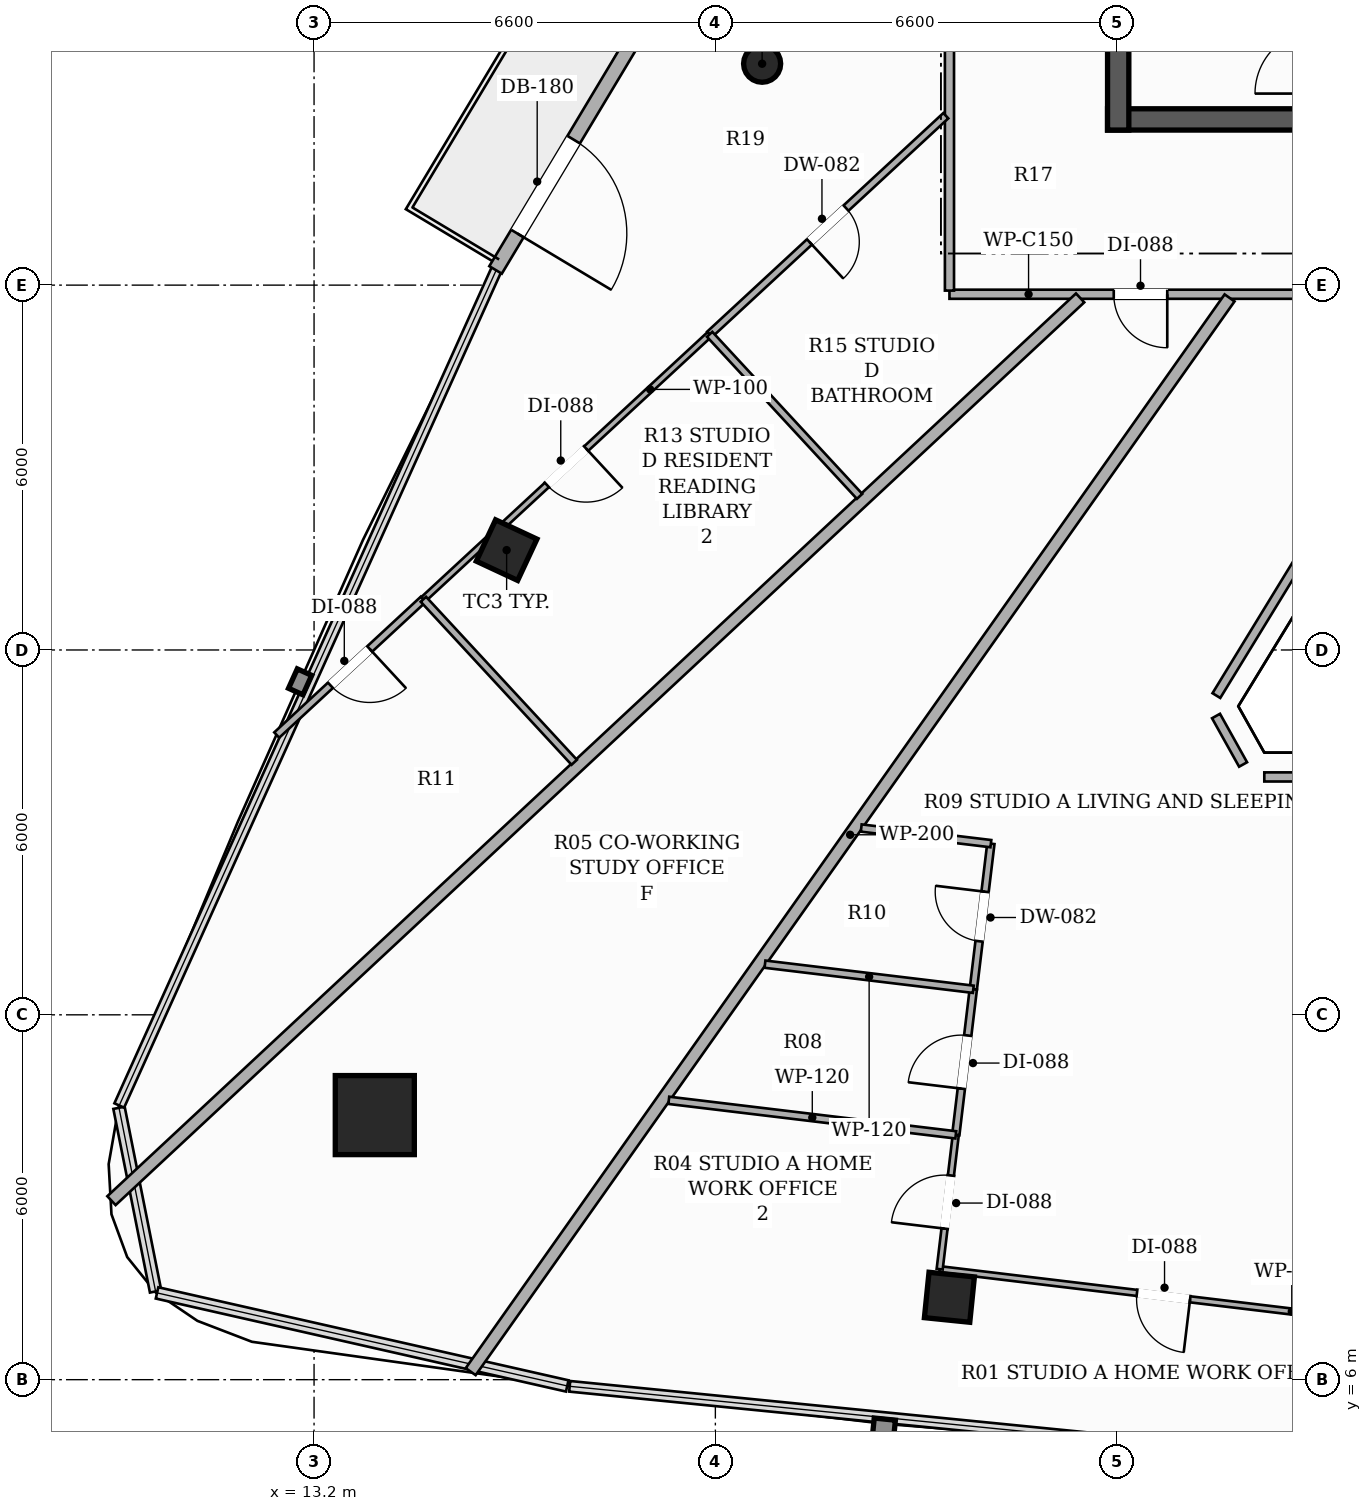
"""IFC4 building model, lengths in metres.
Left out: names, types, materials, properties, quantities, classifications, styles, units other than length and angle.
Written with IfcOpenShell. Run it as: python <this file> out.ifc"""

import sys

from ifc_helpers import new_model, si_unit, direction, frame, frame_2d, origin, origin_2d, place, context, subcontext, project, spatial, rectangle, hollow_rectangle, hollow_circle, extrude, element, fill, save


model = new_model("IFC4")
c1 = context("Model", 3, precision=1e-05, world=origin(), true_north=direction((0.0, 1.0)))
c2 = subcontext(c1, "Body", "Model", "MODEL_VIEW")
j1 = project(units=[si_unit("LENGTHUNIT", "METRE"), si_unit("PLANEANGLEUNIT", "RADIAN")], contexts=[c1])
p1 = place(None, origin())
s1 = spatial("IfcSite", under=j1, at=p1, CompositionType="ELEMENT")
p2 = place(p1, origin())
s2 = spatial("IfcBuilding", under=s1, at=p2, CompositionType="ELEMENT")
p3 = place(p2, frame((0.0, 0.0, 222.8)))
s3 = spatial("IfcBuildingStorey", under=s2, at=p3, CompositionType="ELEMENT", Elevation=222.8)
p4 = place(p3, frame((26.25, 26.725, 0.0), z_axis=(0.0, 0.0, 1.0), x_axis=(1.0, 0.0, 0.0)))
e1 = element("IfcWall", 1, at=p4, inside=s3, PredefinedType="SHEAR", context=c2, shape_type="SweptSolid", body=[
    extrude(rectangle(XDim=13.5, YDim=0.35, at=frame_2d((6.75, 0.0))), origin(), (0.0, 0.0, 1.0), 3.3),
])
p5 = place(p4, frame((4.35, 0.0, 0.0)))
e2 = element("IfcOpeningElement", 2, at=p5, cuts=e1, PredefinedType="OPENING", context=c2, shape_type="SweptSolid", body=[
    extrude(rectangle(XDim=1.05, YDim=2.15, at=frame_2d((0.525, 1.075))), frame((0.0, 0.185, 0.0), z_axis=(0.0, -1.0, 0.0), x_axis=(1.0, 0.0, 0.0)), (0.0, 0.0, 1.0), 0.37),
])
p6 = place(p4, frame((8.3, 0.0, 0.0)))
e3 = element("IfcOpeningElement", 3, at=p6, cuts=e1, PredefinedType="OPENING", context=c2, shape_type="SweptSolid", body=[
    extrude(rectangle(XDim=1.05, YDim=2.15, at=frame_2d((0.525, 1.075))), frame((0.0, 0.185, 0.0), z_axis=(0.0, -1.0, 0.0), x_axis=(1.0, 0.0, 0.0)), (0.0, 0.0, 1.0), 0.37),
])
p7 = place(p3, frame((26.425, 26.55, 0.0), z_axis=(0.0, 0.0, 1.0), x_axis=(0.0, 1.0, 0.0)))
e4 = element("IfcWall", 4, at=p7, inside=s3, PredefinedType="SHEAR", context=c2, shape_type="SweptSolid", body=[
    extrude(rectangle(XDim=7.5, YDim=0.35, at=frame_2d((3.75, 0.0))), origin(), (0.0, 0.0, 1.0), 3.3),
])
p8 = place(p3, frame((14.199, 10.351, 0.0), z_axis=(0.0, 0.0, 1.0), x_axis=(1.0, 0.0, 0.0)))
e5 = element("IfcColumn", 5, at=p8, inside=s3, PredefinedType="COLUMN", context=c2, shape_type="SweptSolid", body=[
    extrude(hollow_rectangle(XDim=1.3, YDim=1.3, WallThickness=0.04, at=origin_2d()), origin(), (0.0, 0.0, 1.0), 3.3),
])
p9 = place(p3, frame((20.569, 27.641, 0.0), z_axis=(0.0, 0.0, 1.0), x_axis=(1.0, 0.0, 0.0)))
e6 = element("IfcColumn", 6, at=p9, inside=s3, PredefinedType="COLUMN", context=c2, shape_type="SweptSolid", body=[
    extrude(hollow_circle(Radius=0.305, WallThickness=0.016, at=origin_2d()), origin(), (0.0, 0.0, 1.0), 3.3),
])
for number, where, z_axis, x_axis in (
    (7, (16.367, 19.642, 0.0), (0.0, 0.0, 1.0), (0.423, 0.906, 0.0)),
    (8, (23.649, 7.355, 0.0), (0.0, 0.0, 1.0), (-0.995, 0.101, 0.0)),
):
    element("IfcColumn", number, at=place(p3, frame(where, z_axis=z_axis, x_axis=x_axis)), inside=s3, PredefinedType="COLUMN", context=c2, shape_type="SweptSolid", body=[
        extrude(hollow_rectangle(XDim=0.75, YDim=0.75, WallThickness=0.025, at=origin_2d()), origin(), (0.0, 0.0, 1.0), 3.3),
    ])
p10 = place(p3, frame((21.458, 33.042, 0.0), z_axis=(0.0, 0.0, 1.0), x_axis=(-0.51433465168, -0.857589567381, 0.0)))
e9 = element("IfcWall", 9, at=p10, inside=s3, PredefinedType="SOLIDWALL", context=c2, shape_type="SweptSolid", body=[
    extrude(rectangle(XDim=10.252, YDim=0.24, at=frame_2d((5.126, 0.0))), origin(), (0.0, 0.0, 1.0), 2.624),
])
p11 = place(p10, frame((7.754, 0.0, 0.0)))
e10 = element("IfcOpeningElement", 10, at=p11, cuts=e9, PredefinedType="OPENING", context=c2, shape_type="SweptSolid", body=[
    extrude(rectangle(XDim=1.8, YDim=2.2, at=frame_2d((0.9, 1.1))), frame((0.0, 0.13, 0.0), z_axis=(0.0, -1.0, 0.0), x_axis=(1.0, 0.0, 0.0)), (0.0, 0.0, 1.0), 0.26),
])
p12 = place(p3, frame((32.073, 23.85, 0.0), z_axis=(0.0, 0.0, 1.0), x_axis=(-1.0, 0.0, 0.0)))
e11 = element("IfcWall", 11, at=p12, inside=s3, PredefinedType="PARTITIONING", context=c2, shape_type="SweptSolid", body=[
    extrude(rectangle(XDim=8.423, YDim=0.15, at=frame_2d((4.211, 0.0))), origin(), (0.0, 0.0, 1.0), 2.565),
])
p13 = place(p12, frame((1.601, 0.0, 0.0)))
e12 = element("IfcOpeningElement", 12, at=p13, cuts=e11, PredefinedType="OPENING", context=c2, shape_type="SweptSolid", body=[
    extrude(rectangle(XDim=0.92, YDim=2.15, at=frame_2d((0.46, 1.075))), frame((0.0, 0.085, 0.0), z_axis=(0.0, -1.0, 0.0), x_axis=(1.0, 0.0, 0.0)), (0.0, 0.0, 1.0), 0.17),
])
p14 = place(p12, frame((4.841, 0.0, 0.0)))
e13 = element("IfcOpeningElement", 13, at=p14, cuts=e11, PredefinedType="OPENING", context=c2, shape_type="SweptSolid", body=[
    extrude(rectangle(XDim=0.88, YDim=2.1, at=frame_2d((0.44, 1.05))), frame((0.0, 0.085, 0.0), z_axis=(0.0, -1.0, 0.0), x_axis=(1.0, 0.0, 0.0)), (0.0, 0.0, 1.0), 0.17),
])
p15 = place(p3, frame((23.65, 23.91, 0.0), z_axis=(0.0, 0.0, 1.0), x_axis=(0.0, 1.0, 0.0)))
e14 = element("IfcWall", 14, at=p15, inside=s3, PredefinedType="PARTITIONING", context=c2, shape_type="SweptSolid", body=[
    extrude(rectangle(XDim=12.163, YDim=0.15, at=frame_2d((6.082, 0.0))), origin(), (0.0, 0.0, 1.0), 2.492),
])
p16 = place(p15, frame((5.622, 0.0, 0.0)))
e15 = element("IfcOpeningElement", 15, at=p16, cuts=e14, PredefinedType="OPENING", context=c2, shape_type="SweptSolid", body=[
    extrude(rectangle(XDim=0.92, YDim=2.15, at=frame_2d((0.46, 1.075))), frame((0.0, 0.085, 0.0), z_axis=(0.0, -1.0, 0.0), x_axis=(1.0, 0.0, 0.0)), (0.0, 0.0, 1.0), 0.17),
])
p17 = place(p3, frame((37.172, 15.912, 0.0), z_axis=(0.0, 0.0, 1.0), x_axis=(-1.0, 0.0, 0.0)))
e16 = element("IfcWall", 16, at=p17, inside=s3, PredefinedType="PARTITIONING", context=c2, shape_type="SweptSolid", body=[
    extrude(rectangle(XDim=8.344, YDim=0.15, at=frame_2d((4.172, 0.0))), origin(), (0.0, 0.0, 1.0), 2.773),
])
p18 = place(p3, frame((28.479, 16.117, 0.0), z_axis=(0.0, 0.0, 1.0), x_axis=(-0.487503666908, 0.873120939361, 0.0)))
e17 = element("IfcWall", 17, at=p18, inside=s3, PredefinedType="PARTITIONING", context=c2, shape_type="SweptSolid", body=[
    extrude(rectangle(XDim=0.913, YDim=0.15, at=frame_2d((0.457, 0.0))), origin(), (0.0, 0.0, 1.0), 3.06),
])
p19 = place(p3, frame((28.04, 17.25, 0.0), z_axis=(0.0, 0.0, 1.0), x_axis=(0.521949656317, 0.852976292912, 0.0)))
e18 = element("IfcWall", 18, at=p19, inside=s3, PredefinedType="PARTITIONING", context=c2, shape_type="SweptSolid", body=[
    extrude(rectangle(XDim=7.667, YDim=0.15, at=frame_2d((3.833, 0.0))), origin(), (0.0, 0.0, 1.0), 2.773),
])
p20 = place(p3, frame((15.776, 6.132, 0.0), z_axis=(0.0, 0.0, 1.0), x_axis=(0.577200381612, 0.816602546816, 0.0)))
e19 = element("IfcWall", 19, at=p20, inside=s3, PredefinedType="PARTITIONING", context=c2, shape_type="SweptSolid", body=[
    extrude(rectangle(XDim=21.624, YDim=0.2, at=frame_2d((10.812, 0.0))), origin(), (0.0, 0.0, 1.0), 2.492),
])
p21 = place(p3, frame((25.799, 23.79, 0.0), z_axis=(0.0, 0.0, 1.0), x_axis=(-0.731584830333, -0.681750420629, 0.0)))
e20 = element("IfcWall", 20, at=p21, inside=s3, PredefinedType="PARTITIONING", context=c2, shape_type="SweptSolid", body=[
    extrude(rectangle(XDim=21.776, YDim=0.2, at=frame_2d((10.888, 0.0))), origin(), (0.0, 0.0, 1.0), 2.492),
])
p22 = place(p3, frame((24.042, 12.42, 0.0), z_axis=(0.0, 0.0, 1.0), x_axis=(0.119823599825, 0.992795197876, 0.0)))
e21 = element("IfcWall", 21, at=p22, inside=s3, PredefinedType="PARTITIONING", context=c2, shape_type="SweptSolid", body=[
    extrude(rectangle(XDim=2.412, YDim=0.12, at=frame_2d((1.206, 0.0))), origin(), (0.0, 0.0, 1.0), 3.06),
])
p23 = place(p22, frame((0.796, 0.0, 0.0)))
e22 = element("IfcOpeningElement", 22, at=p23, cuts=e21, PredefinedType="OPENING", context=c2, shape_type="SweptSolid", body=[
    extrude(rectangle(XDim=0.82, YDim=2.1, at=frame_2d((0.41, 1.05))), frame((0.0, 0.07, 0.0), z_axis=(0.0, -1.0, 0.0), x_axis=(1.0, 0.0, 0.0)), (0.0, 0.0, 1.0), 0.14),
])
p24 = place(p3, frame((24.331, 14.815, 0.0), z_axis=(0.0, 0.0, 1.0), x_axis=(-0.992808897326, 0.119710038805, 0.0)))
e23 = element("IfcWall", 23, at=p24, inside=s3, PredefinedType="PARTITIONING", context=c2, shape_type="SweptSolid", body=[
    extrude(rectangle(XDim=2.147, YDim=0.12, at=frame_2d((1.074, 0.0))), origin(), (0.0, 0.0, 1.0), 3.06),
])
p25 = place(p3, frame((23.754, 10.026, 0.0), z_axis=(0.0, 0.0, 1.0), x_axis=(0.119472593193, 0.992837499028, 0.0)))
e24 = element("IfcWall", 24, at=p25, inside=s3, PredefinedType="PARTITIONING", context=c2, shape_type="SweptSolid", body=[
    extrude(rectangle(XDim=2.411, YDim=0.12, at=frame_2d((1.206, 0.0))), origin(), (0.0, 0.0, 1.0), 3.06),
])
p26 = place(p25, frame((0.766, 0.0, 0.0)))
e25 = element("IfcOpeningElement", 25, at=p26, cuts=e24, PredefinedType="OPENING", context=c2, shape_type="SweptSolid", body=[
    extrude(rectangle(XDim=0.88, YDim=2.1, at=frame_2d((0.44, 1.05))), frame((0.0, 0.07, 0.0), z_axis=(0.0, -1.0, 0.0), x_axis=(1.0, 0.0, 0.0)), (0.0, 0.0, 1.0), 0.14),
])
p27 = place(p3, frame((30.853, 6.931, 0.0), z_axis=(0.0, 0.0, 1.0), x_axis=(-0.992840033501, 0.119451529409, 0.0)))
e26 = element("IfcWall", 26, at=p27, inside=s3, PredefinedType="PARTITIONING", context=c2, shape_type="SweptSolid", body=[
    extrude(rectangle(XDim=7.417, YDim=0.1, at=frame_2d((3.708, 0.0))), origin(), (0.0, 0.0, 1.0), 2.492),
])
p28 = place(p27, frame((3.269, 0.0, 0.0)))
e27 = element("IfcOpeningElement", 27, at=p28, cuts=e26, PredefinedType="OPENING", context=c2, shape_type="SweptSolid", body=[
    extrude(rectangle(XDim=0.88, YDim=2.1, at=frame_2d((0.44, 1.05))), frame((0.0, 0.06, 0.0), z_axis=(0.0, -1.0, 0.0), x_axis=(1.0, 0.0, 0.0)), (0.0, 0.0, 1.0), 0.12),
])
p29 = place(p3, frame((23.489, 7.817, 0.0), z_axis=(0.0, 0.0, 1.0), x_axis=(0.119063005136, 0.992886700892, 0.0)))
e28 = element("IfcWall", 28, at=p29, inside=s3, PredefinedType="PARTITIONING", context=c2, shape_type="SweptSolid", body=[
    extrude(rectangle(XDim=2.225, YDim=0.1, at=frame_2d((1.112, 0.0))), origin(), (0.0, 0.0, 1.0), 2.492),
])
p30 = place(p29, frame((0.672, 0.0, 0.0)))
e29 = element("IfcOpeningElement", 29, at=p30, cuts=e28, PredefinedType="OPENING", context=c2, shape_type="SweptSolid", body=[
    extrude(rectangle(XDim=0.88, YDim=2.1, at=frame_2d((0.44, 1.05))), frame((0.0, 0.06, 0.0), z_axis=(0.0, -1.0, 0.0), x_axis=(1.0, 0.0, 0.0)), (0.0, 0.0, 1.0), 0.12),
])
p31 = place(p3, frame((24.042, 12.42, 0.0), z_axis=(0.0, 0.0, 1.0), x_axis=(-0.992809391247, 0.119705942421, 0.0)))
e30 = element("IfcWall", 30, at=p31, inside=s3, PredefinedType="PARTITIONING", context=c2, shape_type="SweptSolid", body=[
    extrude(rectangle(XDim=3.451, YDim=0.12, at=frame_2d((1.726, 0.0))), origin(), (0.0, 0.0, 1.0), 2.773),
])
p32 = place(p3, frame((23.754, 10.026, 0.0), z_axis=(0.0, 0.0, 1.0), x_axis=(-0.992834006213, 0.1195016155, 0.0)))
e31 = element("IfcWall", 31, at=p32, inside=s3, PredefinedType="PARTITIONING", context=c2, shape_type="SweptSolid", body=[
    extrude(rectangle(XDim=4.754, YDim=0.12, at=frame_2d((2.377, 0.0))), origin(), (0.0, 0.0, 1.0), 2.773),
])
p33 = place(p3, frame((23.59, 26.786, 0.0), z_axis=(0.0, 0.0, 1.0), x_axis=(-0.733888422473, -0.679270037143, 0.0)))
e32 = element("IfcWall", 32, at=p33, inside=s3, PredefinedType="PARTITIONING", context=c2, shape_type="SweptSolid", body=[
    extrude(rectangle(XDim=5.292, YDim=0.12, at=frame_2d((2.646, 0.0))), origin(), (0.0, 0.0, 1.0), 3.06),
])
p34 = place(p33, frame((2.236, 0.0, 0.0)))
e33 = element("IfcOpeningElement", 33, at=p34, cuts=e32, PredefinedType="OPENING", context=c2, shape_type="SweptSolid", body=[
    extrude(rectangle(XDim=0.82, YDim=2.1, at=frame_2d((0.41, 1.05))), frame((0.0, 0.07, 0.0), z_axis=(0.0, -1.0, 0.0), x_axis=(1.0, 0.0, 0.0)), (0.0, 0.0, 1.0), 0.14),
])
p35 = place(p3, frame((14.998, 18.834, 0.0), z_axis=(0.0, 0.0, 1.0), x_axis=(-0.733840210512, -0.679322121998, 0.0)))
e34 = element("IfcWall", 34, at=p35, inside=s3, PredefinedType="PARTITIONING", context=c2, shape_type="SweptSolid", body=[
    extrude(rectangle(XDim=3.287, YDim=0.12, at=frame_2d((1.644, 0.0))), origin(), (0.0, 0.0, 1.0), 3.06),
])
p36 = place(p35, frame((1.203, 0.0, 0.0)))
e35 = element("IfcOpeningElement", 35, at=p36, cuts=e34, PredefinedType="OPENING", context=c2, shape_type="SweptSolid", body=[
    extrude(rectangle(XDim=0.88, YDim=2.1, at=frame_2d((0.44, 1.05))), frame((0.0, 0.07, 0.0), z_axis=(0.0, -1.0, 0.0), x_axis=(1.0, 0.0, 0.0)), (0.0, 0.0, 1.0), 0.14),
])
p37 = place(p3, frame((19.706, 23.191, 0.0), z_axis=(0.0, 0.0, 1.0), x_axis=(-0.733941951163, -0.679212199775, 0.0)))
e36 = element("IfcWall", 36, at=p37, inside=s3, PredefinedType="PARTITIONING", context=c2, shape_type="SweptSolid", body=[
    extrude(rectangle(XDim=6.415, YDim=0.1, at=frame_2d((3.208, 0.0))), origin(), (0.0, 0.0, 1.0), 2.492),
])
p38 = place(p37, frame((2.767, 0.0, 0.0)))
e37 = element("IfcOpeningElement", 37, at=p38, cuts=e36, PredefinedType="OPENING", context=c2, shape_type="SweptSolid", body=[
    extrude(rectangle(XDim=0.88, YDim=2.1, at=frame_2d((0.44, 1.05))), frame((0.0, 0.06, 0.0), z_axis=(0.0, -1.0, 0.0), x_axis=(1.0, 0.0, 0.0)), (0.0, 0.0, 1.0), 0.12),
])
p39 = place(p3, frame((22.172, 20.526, 0.0), z_axis=(0.0, 0.0, 1.0), x_axis=(-0.67917603964, 0.733975413198, 0.0)))
e38 = element("IfcWall", 38, at=p39, inside=s3, PredefinedType="PARTITIONING", context=c2, shape_type="SweptSolid", body=[
    extrude(rectangle(XDim=3.631, YDim=0.12, at=frame_2d((1.815, 0.0))), origin(), (0.0, 0.0, 1.0), 2.565),
])
p40 = place(p3, frame((14.998, 18.834, 0.0), z_axis=(0.0, 0.0, 1.0), x_axis=(0.67920675179, -0.733946992856, 0.0)))
e39 = element("IfcWall", 39, at=p40, inside=s3, PredefinedType="PARTITIONING", context=c2, shape_type="SweptSolid", body=[
    extrude(rectangle(XDim=3.653, YDim=0.12, at=frame_2d((1.826, 0.0))), origin(), (0.0, 0.0, 1.0), 2.492),
])
p41 = place(p11, origin())
e40 = element("IfcDoor", 40, at=p41, inside=s3, OperationType="SINGLE_SWING_RIGHT", PredefinedType="DOOR", context=c2, shape_type="SweptSolid", body=[
    extrude(rectangle(XDim=1.8, YDim=2.2, at=frame_2d((0.9, 1.1))), frame((0.0, 0.025, 0.0), z_axis=(0.0, -1.0, 0.0), x_axis=(1.0, 0.0, 0.0)), (0.0, 0.0, 1.0), 0.05),
])
fill(e10, e40)
p42 = place(p23, origin())
e41 = element("IfcDoor", 41, at=p42, inside=s3, OperationType="SINGLE_SWING_RIGHT", PredefinedType="DOOR", context=c2, shape_type="SweptSolid", body=[
    extrude(rectangle(XDim=0.82, YDim=2.1, at=frame_2d((0.41, 1.05))), frame((0.0, 0.025, 0.0), z_axis=(0.0, -1.0, 0.0), x_axis=(1.0, 0.0, 0.0)), (0.0, 0.0, 1.0), 0.05),
])
fill(e22, e41)
p43 = place(p26, origin())
e42 = element("IfcDoor", 42, at=p43, inside=s3, OperationType="SINGLE_SWING_LEFT", PredefinedType="DOOR", context=c2, shape_type="SweptSolid", body=[
    extrude(rectangle(XDim=0.88, YDim=2.1, at=frame_2d((0.44, 1.05))), frame((0.0, 0.025, 0.0), z_axis=(0.0, -1.0, 0.0), x_axis=(1.0, 0.0, 0.0)), (0.0, 0.0, 1.0), 0.05),
])
fill(e25, e42)
p44 = place(p28, origin())
e43 = element("IfcDoor", 43, at=p44, inside=s3, OperationType="SINGLE_SWING_LEFT", PredefinedType="DOOR", context=c2, shape_type="SweptSolid", body=[
    extrude(rectangle(XDim=0.88, YDim=2.1, at=frame_2d((0.44, 1.05))), frame((0.0, 0.025, 0.0), z_axis=(0.0, -1.0, 0.0), x_axis=(1.0, 0.0, 0.0)), (0.0, 0.0, 1.0), 0.05),
])
fill(e27, e43)
p45 = place(p30, origin())
e44 = element("IfcDoor", 44, at=p45, inside=s3, OperationType="SINGLE_SWING_LEFT", PredefinedType="DOOR", context=c2, shape_type="SweptSolid", body=[
    extrude(rectangle(XDim=0.88, YDim=2.1, at=frame_2d((0.44, 1.05))), frame((0.0, 0.025, 0.0), z_axis=(0.0, -1.0, 0.0), x_axis=(1.0, 0.0, 0.0)), (0.0, 0.0, 1.0), 0.05),
])
fill(e29, e44)
p46 = place(p34, origin())
e45 = element("IfcDoor", 45, at=p46, inside=s3, OperationType="SINGLE_SWING_RIGHT", PredefinedType="DOOR", context=c2, shape_type="SweptSolid", body=[
    extrude(rectangle(XDim=0.82, YDim=2.1, at=frame_2d((0.41, 1.05))), frame((0.0, 0.025, 0.0), z_axis=(0.0, -1.0, 0.0), x_axis=(1.0, 0.0, 0.0)), (0.0, 0.0, 1.0), 0.05),
])
fill(e33, e45)
p47 = place(p36, origin())
e46 = element("IfcDoor", 46, at=p47, inside=s3, OperationType="SINGLE_SWING_LEFT", PredefinedType="DOOR", context=c2, shape_type="SweptSolid", body=[
    extrude(rectangle(XDim=0.88, YDim=2.1, at=frame_2d((0.44, 1.05))), frame((0.0, 0.025, 0.0), z_axis=(0.0, -1.0, 0.0), x_axis=(1.0, 0.0, 0.0)), (0.0, 0.0, 1.0), 0.05),
])
fill(e35, e46)
p48 = place(p38, origin())
e47 = element("IfcDoor", 47, at=p48, inside=s3, OperationType="SINGLE_SWING_LEFT", PredefinedType="DOOR", context=c2, shape_type="SweptSolid", body=[
    extrude(rectangle(XDim=0.88, YDim=2.1, at=frame_2d((0.44, 1.05))), frame((0.0, 0.025, 0.0), z_axis=(0.0, -1.0, 0.0), x_axis=(1.0, 0.0, 0.0)), (0.0, 0.0, 1.0), 0.05),
])
fill(e37, e47)
p49 = place(p14, origin())
e48 = element("IfcDoor", 48, at=p49, inside=s3, OperationType="SINGLE_SWING_LEFT", PredefinedType="DOOR", context=c2, shape_type="SweptSolid", body=[
    extrude(rectangle(XDim=0.88, YDim=2.1, at=frame_2d((0.44, 1.05))), frame((0.0, 0.025, 0.0), z_axis=(0.0, -1.0, 0.0), x_axis=(1.0, 0.0, 0.0)), (0.0, 0.0, 1.0), 0.05),
])
fill(e13, e48)
save(model, sys.argv[1])
